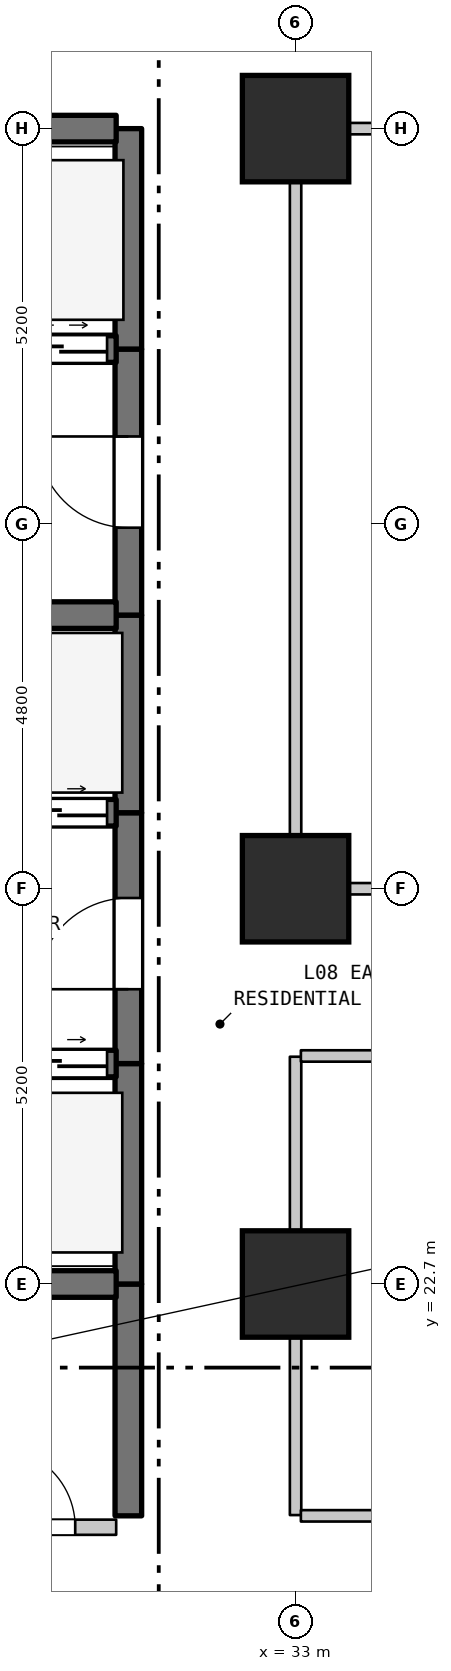
"""IFC4 building model, lengths in metres.
Left out: names, types, materials, properties, quantities, classifications, styles, units other than length and angle.
Written with IfcOpenShell. Run it as: python <this file> out.ifc"""

import sys

from ifc_helpers import new_model, si_unit, direction, frame, frame_2d, origin, origin_2d, place, context, subcontext, project, spatial, rectangle, extrude, element, fill, save


model = new_model("IFC4")
c1 = context("Model", 3, precision=1e-05, world=origin(), true_north=direction((0.0, 1.0)))
c2 = subcontext(c1, "Body", "Model", "MODEL_VIEW")
j1 = project(units=[si_unit("LENGTHUNIT", "METRE"), si_unit("PLANEANGLEUNIT", "RADIAN")], contexts=[c1])
p1 = place(None, origin())
s1 = spatial("IfcSite", under=j1, at=p1, CompositionType="ELEMENT")
p2 = place(p1, origin())
s2 = spatial("IfcBuilding", under=s1, at=p2, CompositionType="ELEMENT")
p3 = place(p2, frame((0.0, 0.0, 38.8)))
s3 = spatial("IfcBuildingStorey", under=s2, at=p3, CompositionType="ELEMENT", Elevation=38.8)
for number, where, z_axis, x_axis in (
    (1, (33.0, 22.7, 0.0), (0.0, 0.0, 1.0), (1.0, 0.0, 0.0)),
    (2, (33.0, 27.9, 0.0), (0.0, 0.0, 1.0), (1.0, 0.0, 0.0)),
    (3, (33.0, 37.9, 0.0), (0.0, 0.0, 1.0), (1.0, 0.0, 0.0)),
):
    element("IfcColumn", number, at=place(p3, frame(where, z_axis=z_axis, x_axis=x_axis)), inside=s3, PredefinedType="COLUMN", context=c2, shape_type="SweptSolid", body=[
        extrude(rectangle(XDim=1.4, YDim=1.4, at=origin_2d()), origin(), (0.0, 0.0, 1.0), 3.7),
    ])
p4 = place(p3, frame((30.8, 19.65, 0.0), z_axis=(0.0, 0.0, 1.0), x_axis=(0.0, 1.0, 0.0)))
e4 = element("IfcWall", 4, at=p4, inside=s3, PredefinedType="SHEAR", context=c2, shape_type="SweptSolid", body=[
    extrude(rectangle(XDim=3.05, YDim=0.35, at=frame_2d((1.525, 0.0))), origin(), (0.0, 0.0, 1.0), 3.385),
])
p5 = place(p3, frame((30.8, 22.7, 0.0), z_axis=(0.0, 0.0, 1.0), x_axis=(0.0, 1.0, 0.0)))
e5 = element("IfcWall", 5, at=p5, inside=s3, PredefinedType="SHEAR", context=c2, shape_type="SweptSolid", body=[
    extrude(rectangle(XDim=2.9, YDim=0.35, at=frame_2d((1.45, 0.0))), origin(), (0.0, 0.0, 1.0), 3.385),
])
p6 = place(p3, frame((30.8, 25.6, 0.0), z_axis=(0.0, 0.0, 1.0), x_axis=(0.0, 1.0, 0.0)))
e6 = element("IfcWall", 6, at=p6, inside=s3, PredefinedType="SHEAR", context=c2, shape_type="SweptSolid", body=[
    extrude(rectangle(XDim=3.3, YDim=0.35, at=frame_2d((1.65, 0.0))), origin(), (0.0, 0.0, 1.0), 3.385),
])
p7 = place(p6, frame((0.978, 0.0, 0.0)))
e7 = element("IfcOpeningElement", 7, at=p7, cuts=e6, PredefinedType="OPENING", context=c2, shape_type="SweptSolid", body=[
    extrude(rectangle(XDim=1.2, YDim=2.2, at=frame_2d((0.6, 1.1))), frame((0.0, 0.185, 0.0), z_axis=(0.0, -1.0, 0.0), x_axis=(1.0, 0.0, 0.0)), (0.0, 0.0, 1.0), 0.37),
])
p8 = place(p3, frame((30.8, 28.9, 0.0), z_axis=(0.0, 0.0, 1.0), x_axis=(0.0, 1.0, 0.0)))
e8 = element("IfcWall", 8, at=p8, inside=s3, PredefinedType="SHEAR", context=c2, shape_type="SweptSolid", body=[
    extrude(rectangle(XDim=2.6, YDim=0.35, at=frame_2d((1.3, 0.0))), origin(), (0.0, 0.0, 1.0), 3.385),
])
p9 = place(p3, frame((30.8, 31.5, 0.0), z_axis=(0.0, 0.0, 1.0), x_axis=(0.0, 1.0, 0.0)))
e9 = element("IfcWall", 9, at=p9, inside=s3, PredefinedType="SHEAR", context=c2, shape_type="SweptSolid", body=[
    extrude(rectangle(XDim=3.5, YDim=0.35, at=frame_2d((1.75, 0.0))), origin(), (0.0, 0.0, 1.0), 3.385),
])
p10 = place(p9, frame((1.15, 0.0, 0.0)))
e10 = element("IfcOpeningElement", 10, at=p10, cuts=e9, PredefinedType="OPENING", context=c2, shape_type="SweptSolid", body=[
    extrude(rectangle(XDim=1.2, YDim=2.2, at=frame_2d((0.6, 1.1))), frame((0.0, 0.185, 0.0), z_axis=(0.0, -1.0, 0.0), x_axis=(1.0, 0.0, 0.0)), (0.0, 0.0, 1.0), 0.37),
])
p11 = place(p3, frame((30.8, 35.0, 0.0), z_axis=(0.0, 0.0, 1.0), x_axis=(0.0, 1.0, 0.0)))
e11 = element("IfcWall", 11, at=p11, inside=s3, PredefinedType="SHEAR", context=c2, shape_type="SweptSolid", body=[
    extrude(rectangle(XDim=2.9, YDim=0.35, at=frame_2d((1.45, 0.0))), origin(), (0.0, 0.0, 1.0), 3.385),
])
p12 = place(p3, frame((33.0, 19.66, 0.0), z_axis=(0.0, 0.0, 1.0), x_axis=(0.0, 1.0, 0.0)))
e12 = element("IfcWall", 12, at=p12, inside=s3, PredefinedType="STANDARD", context=c2, shape_type="SweptSolid", body=[
    extrude(rectangle(XDim=6.03, YDim=0.15, at=frame_2d((3.015, 0.0))), origin(), (0.0, 0.0, 1.0), 2.885),
])
p13 = place(p3, frame((33.0, 27.91, 0.0), z_axis=(0.0, 0.0, 1.0), x_axis=(0.0, 1.0, 0.0)))
e13 = element("IfcWall", 13, at=p13, inside=s3, PredefinedType="STANDARD", context=c2, shape_type="SweptSolid", body=[
    extrude(rectangle(XDim=9.98, YDim=0.15, at=frame_2d((4.99, 0.0))), origin(), (0.0, 0.0, 1.0), 2.885),
])
p14 = place(p3, frame((28.585, 19.5, 0.0), z_axis=(0.0, 0.0, 1.0), x_axis=(1.0, 0.0, 0.0)))
e14 = element("IfcWall", 14, at=p14, inside=s3, PredefinedType="STANDARD", context=c2, shape_type="SweptSolid", body=[
    extrude(rectangle(XDim=2.055, YDim=0.2, at=frame_2d((1.027, 0.0))), origin(), (0.0, 0.0, 1.0), 3.385),
])
p15 = place(p14, frame((0.466, 0.0, 0.0)))
e15 = element("IfcOpeningElement", 15, at=p15, cuts=e14, PredefinedType="OPENING", context=c2, shape_type="SweptSolid", body=[
    extrude(rectangle(XDim=1.05, YDim=2.15, at=frame_2d((0.525, 1.075))), frame((0.0, 0.11, 0.0), z_axis=(0.0, -1.0, 0.0), x_axis=(1.0, 0.0, 0.0)), (0.0, 0.0, 1.0), 0.22),
])
p16 = place(p3, frame((33.07, 19.65, 0.0), z_axis=(0.0, 0.0, 1.0), x_axis=(1.0, 0.0, 0.0)))
e16 = element("IfcWall", 16, at=p16, inside=s3, PredefinedType="STANDARD", context=c2, shape_type="SweptSolid", body=[
    extrude(rectangle(XDim=33.27, YDim=0.15, at=frame_2d((16.635, 0.0))), origin(), (0.0, 0.0, 1.0), 3.385),
])
p17 = place(p16, frame((16.065, 0.0, 0.0)))
e17 = element("IfcOpeningElement", 17, at=p17, cuts=e16, PredefinedType="OPENING", context=c2, shape_type="SweptSolid", body=[
    extrude(rectangle(XDim=1.0, YDim=2.15, at=frame_2d((0.5, 1.075))), frame((0.0, 0.085, 0.0), z_axis=(0.0, -1.0, 0.0), x_axis=(1.0, 0.0, 0.0)), (0.0, 0.0, 1.0), 0.17),
])
p18 = place(p3, frame((28.585, 22.7, 0.0), z_axis=(0.0, 0.0, 1.0), x_axis=(1.0, 0.0, 0.0)))
e18 = element("IfcWall", 18, at=p18, inside=s3, PredefinedType="SHEAR", context=c2, shape_type="SweptSolid", body=[
    extrude(rectangle(XDim=2.055, YDim=0.35, at=frame_2d((1.027, 0.0))), origin(), (0.0, 0.0, 1.0), 3.385),
])
p19 = place(p3, frame((27.46, 25.6, 0.0), z_axis=(0.0, 0.0, 1.0), x_axis=(1.0, 0.0, 0.0)))
e19 = element("IfcWall", 19, at=p19, inside=s3, PredefinedType="SHEAR", context=c2, shape_type="SweptSolid", body=[
    extrude(rectangle(XDim=3.18, YDim=0.35, at=frame_2d((1.59, 0.0))), origin(), (0.0, 0.0, 1.0), 3.385),
])
p20 = place(p19, frame((0.12, 0.0, 0.0)))
e20 = element("IfcOpeningElement", 20, at=p20, cuts=e19, PredefinedType="OPENING", context=c2, shape_type="SweptSolid", body=[
    extrude(rectangle(XDim=1.25, YDim=2.2, at=frame_2d((0.625, 1.1))), frame((0.0, 0.185, 0.0), z_axis=(0.0, -1.0, 0.0), x_axis=(1.0, 0.0, 0.0)), (0.0, 0.0, 1.0), 0.37),
])
p21 = place(p19, frame((1.81, 0.0, 0.0)))
e21 = element("IfcOpeningElement", 21, at=p21, cuts=e19, PredefinedType="OPENING", context=c2, shape_type="SweptSolid", body=[
    extrude(rectangle(XDim=1.25, YDim=2.2, at=frame_2d((0.625, 1.1))), frame((0.0, 0.185, 0.0), z_axis=(0.0, -1.0, 0.0), x_axis=(1.0, 0.0, 0.0)), (0.0, 0.0, 1.0), 0.37),
])
p22 = place(p3, frame((33.07, 25.7, 0.0), z_axis=(0.0, 0.0, 1.0), x_axis=(1.0, 0.0, 0.0)))
e22 = element("IfcWall", 22, at=p22, inside=s3, PredefinedType="STANDARD", context=c2, shape_type="SweptSolid", body=[
    extrude(rectangle(XDim=30.87, YDim=0.15, at=frame_2d((15.435, 0.0))), origin(), (0.0, 0.0, 1.0), 3.385),
])
p23 = place(p3, frame((33.07, 27.9, 0.0), z_axis=(0.0, 0.0, 1.0), x_axis=(1.0, 0.0, 0.0)))
e23 = element("IfcWall", 23, at=p23, inside=s3, PredefinedType="STANDARD", context=c2, shape_type="SweptSolid", body=[
    extrude(rectangle(XDim=30.87, YDim=0.15, at=frame_2d((15.435, 0.0))), origin(), (0.0, 0.0, 1.0), 2.885),
])
p24 = place(p23, frame((14.935, 0.0, 0.0)))
e24 = element("IfcOpeningElement", 24, at=p24, cuts=e23, PredefinedType="OPENING", context=c2, shape_type="SweptSolid", body=[
    extrude(rectangle(XDim=1.0, YDim=2.15, at=frame_2d((0.5, 1.075))), frame((0.0, 0.085, 0.0), z_axis=(0.0, -1.0, 0.0), x_axis=(1.0, 0.0, 0.0)), (0.0, 0.0, 1.0), 0.17),
])
p25 = place(p3, frame((27.46, 28.9, 0.0), z_axis=(0.0, 0.0, 1.0), x_axis=(1.0, 0.0, 0.0)))
e25 = element("IfcWall", 25, at=p25, inside=s3, PredefinedType="SHEAR", context=c2, shape_type="SweptSolid", body=[
    extrude(rectangle(XDim=3.18, YDim=0.35, at=frame_2d((1.59, 0.0))), origin(), (0.0, 0.0, 1.0), 3.385),
])
p26 = place(p25, frame((0.12, 0.0, 0.0)))
e26 = element("IfcOpeningElement", 26, at=p26, cuts=e25, PredefinedType="OPENING", context=c2, shape_type="SweptSolid", body=[
    extrude(rectangle(XDim=1.25, YDim=2.2, at=frame_2d((0.625, 1.1))), frame((0.0, 0.185, 0.0), z_axis=(0.0, -1.0, 0.0), x_axis=(1.0, 0.0, 0.0)), (0.0, 0.0, 1.0), 0.37),
])
p27 = place(p25, frame((1.81, 0.0, 0.0)))
e27 = element("IfcOpeningElement", 27, at=p27, cuts=e25, PredefinedType="OPENING", context=c2, shape_type="SweptSolid", body=[
    extrude(rectangle(XDim=1.25, YDim=2.2, at=frame_2d((0.625, 1.1))), frame((0.0, 0.185, 0.0), z_axis=(0.0, -1.0, 0.0), x_axis=(1.0, 0.0, 0.0)), (0.0, 0.0, 1.0), 0.37),
])
p28 = place(p3, frame((27.46, 31.5, 0.0), z_axis=(0.0, 0.0, 1.0), x_axis=(1.0, 0.0, 0.0)))
e28 = element("IfcWall", 28, at=p28, inside=s3, PredefinedType="SHEAR", context=c2, shape_type="SweptSolid", body=[
    extrude(rectangle(XDim=3.18, YDim=0.35, at=frame_2d((1.59, 0.0))), origin(), (0.0, 0.0, 1.0), 3.385),
])
p29 = place(p3, frame((19.16, 35.0, 0.0), z_axis=(0.0, 0.0, 1.0), x_axis=(1.0, 0.0, 0.0)))
e29 = element("IfcWall", 29, at=p29, inside=s3, PredefinedType="SHEAR", context=c2, shape_type="SweptSolid", body=[
    extrude(rectangle(XDim=11.48, YDim=0.35, at=frame_2d((5.74, 0.0))), origin(), (0.0, 0.0, 1.0), 3.385),
])
p30 = place(p29, frame((0.365, 0.0, 0.0)))
e30 = element("IfcOpeningElement", 30, at=p30, cuts=e29, PredefinedType="OPENING", context=c2, shape_type="SweptSolid", body=[
    extrude(rectangle(XDim=1.35, YDim=2.2, at=frame_2d((0.675, 1.1))), frame((0.0, 0.185, 0.0), z_axis=(0.0, -1.0, 0.0), x_axis=(1.0, 0.0, 0.0)), (0.0, 0.0, 1.0), 0.37),
])
p31 = place(p29, frame((2.765, 0.0, 0.0)))
e31 = element("IfcOpeningElement", 31, at=p31, cuts=e29, PredefinedType="OPENING", context=c2, shape_type="SweptSolid", body=[
    extrude(rectangle(XDim=1.35, YDim=2.2, at=frame_2d((0.675, 1.1))), frame((0.0, 0.185, 0.0), z_axis=(0.0, -1.0, 0.0), x_axis=(1.0, 0.0, 0.0)), (0.0, 0.0, 1.0), 0.37),
])
p32 = place(p29, frame((4.915, 0.0, 0.0)))
e32 = element("IfcOpeningElement", 32, at=p32, cuts=e29, PredefinedType="OPENING", context=c2, shape_type="SweptSolid", body=[
    extrude(rectangle(XDim=1.2, YDim=2.2, at=frame_2d((0.6, 1.1))), frame((0.0, 0.185, 0.0), z_axis=(0.0, -1.0, 0.0), x_axis=(1.0, 0.0, 0.0)), (0.0, 0.0, 1.0), 0.37),
])
p33 = place(p29, frame((6.665, 0.0, 0.0)))
e33 = element("IfcOpeningElement", 33, at=p33, cuts=e29, PredefinedType="OPENING", context=c2, shape_type="SweptSolid", body=[
    extrude(rectangle(XDim=1.2, YDim=2.2, at=frame_2d((0.6, 1.1))), frame((0.0, 0.185, 0.0), z_axis=(0.0, -1.0, 0.0), x_axis=(1.0, 0.0, 0.0)), (0.0, 0.0, 1.0), 0.37),
])
p34 = place(p29, frame((8.415, 0.0, 0.0)))
e34 = element("IfcOpeningElement", 34, at=p34, cuts=e29, PredefinedType="OPENING", context=c2, shape_type="SweptSolid", body=[
    extrude(rectangle(XDim=1.2, YDim=2.2, at=frame_2d((0.6, 1.1))), frame((0.0, 0.185, 0.0), z_axis=(0.0, -1.0, 0.0), x_axis=(1.0, 0.0, 0.0)), (0.0, 0.0, 1.0), 0.37),
])
p35 = place(p29, frame((10.16, 0.0, 0.0)))
e35 = element("IfcOpeningElement", 35, at=p35, cuts=e29, PredefinedType="OPENING", context=c2, shape_type="SweptSolid", body=[
    extrude(rectangle(XDim=1.2, YDim=2.2, at=frame_2d((0.6, 1.1))), frame((0.0, 0.185, 0.0), z_axis=(0.0, -1.0, 0.0), x_axis=(1.0, 0.0, 0.0)), (0.0, 0.0, 1.0), 0.37),
])
p36 = place(p3, frame((19.16, 37.9, 0.0), z_axis=(0.0, 0.0, 1.0), x_axis=(1.0, 0.0, 0.0)))
e36 = element("IfcWall", 36, at=p36, inside=s3, PredefinedType="SHEAR", context=c2, shape_type="SweptSolid", body=[
    extrude(rectangle(XDim=11.48, YDim=0.35, at=frame_2d((5.74, 0.0))), origin(), (0.0, 0.0, 1.0), 3.385),
])
p37 = place(p3, frame((33.07, 37.9, 0.0), z_axis=(0.0, 0.0, 1.0), x_axis=(1.0, 0.0, 0.0)))
e37 = element("IfcWall", 37, at=p37, inside=s3, PredefinedType="STANDARD", context=c2, shape_type="SweptSolid", body=[
    extrude(rectangle(XDim=26.935, YDim=0.15, at=frame_2d((13.467, 0.0))), origin(), (0.0, 0.0, 1.0), 3.385),
])
p38 = place(p7, origin())
e38 = element("IfcDoor", 38, at=p38, inside=s3, OperationType="SINGLE_SWING_LEFT", PredefinedType="DOOR", context=c2, shape_type="SweptSolid", body=[
    extrude(rectangle(XDim=1.2, YDim=2.2, at=frame_2d((0.6, 1.1))), frame((0.0, 0.025, 0.0), z_axis=(0.0, -1.0, 0.0), x_axis=(1.0, 0.0, 0.0)), (0.0, 0.0, 1.0), 0.05),
])
fill(e7, e38)
p39 = place(p10, origin())
e39 = element("IfcDoor", 39, at=p39, inside=s3, OperationType="SINGLE_SWING_RIGHT", PredefinedType="DOOR", context=c2, shape_type="SweptSolid", body=[
    extrude(rectangle(XDim=1.2, YDim=2.2, at=frame_2d((0.6, 1.1))), frame((0.0, 0.025, 0.0), z_axis=(0.0, -1.0, 0.0), x_axis=(1.0, 0.0, 0.0)), (0.0, 0.0, 1.0), 0.05),
])
fill(e10, e39)
p40 = place(p15, origin())
e40 = element("IfcDoor", 40, at=p40, inside=s3, OperationType="SINGLE_SWING_LEFT", PredefinedType="DOOR", context=c2, shape_type="SweptSolid", body=[
    extrude(rectangle(XDim=1.05, YDim=2.15, at=frame_2d((0.525, 1.075))), frame((0.0, 0.025, 0.0), z_axis=(0.0, -1.0, 0.0), x_axis=(1.0, 0.0, 0.0)), (0.0, 0.0, 1.0), 0.05),
])
fill(e15, e40)
p41 = place(p21, origin())
e41 = element("IfcDoor", 41, at=p41, inside=s3, OperationType="DOUBLE_DOOR_SLIDING", PredefinedType="DOOR", context=c2, shape_type="SweptSolid", body=[
    extrude(rectangle(XDim=1.25, YDim=2.2, at=frame_2d((0.625, 1.1))), frame((0.0, 0.025, 0.0), z_axis=(0.0, -1.0, 0.0), x_axis=(1.0, 0.0, 0.0)), (0.0, 0.0, 1.0), 0.05),
])
fill(e21, e41)
p42 = place(p27, origin())
e42 = element("IfcDoor", 42, at=p42, inside=s3, OperationType="DOUBLE_DOOR_SLIDING", PredefinedType="DOOR", context=c2, shape_type="SweptSolid", body=[
    extrude(rectangle(XDim=1.25, YDim=2.2, at=frame_2d((0.625, 1.1))), frame((0.0, 0.025, 0.0), z_axis=(0.0, -1.0, 0.0), x_axis=(1.0, 0.0, 0.0)), (0.0, 0.0, 1.0), 0.05),
])
fill(e27, e42)
p43 = place(p35, origin())
e43 = element("IfcDoor", 43, at=p43, inside=s3, OperationType="DOUBLE_DOOR_SLIDING", PredefinedType="DOOR", context=c2, shape_type="SweptSolid", body=[
    extrude(rectangle(XDim=1.2, YDim=2.2, at=frame_2d((0.6, 1.1))), frame((0.0, 0.025, 0.0), z_axis=(0.0, -1.0, 0.0), x_axis=(1.0, 0.0, 0.0)), (0.0, 0.0, 1.0), 0.05),
])
fill(e35, e43)
save(model, sys.argv[1])
